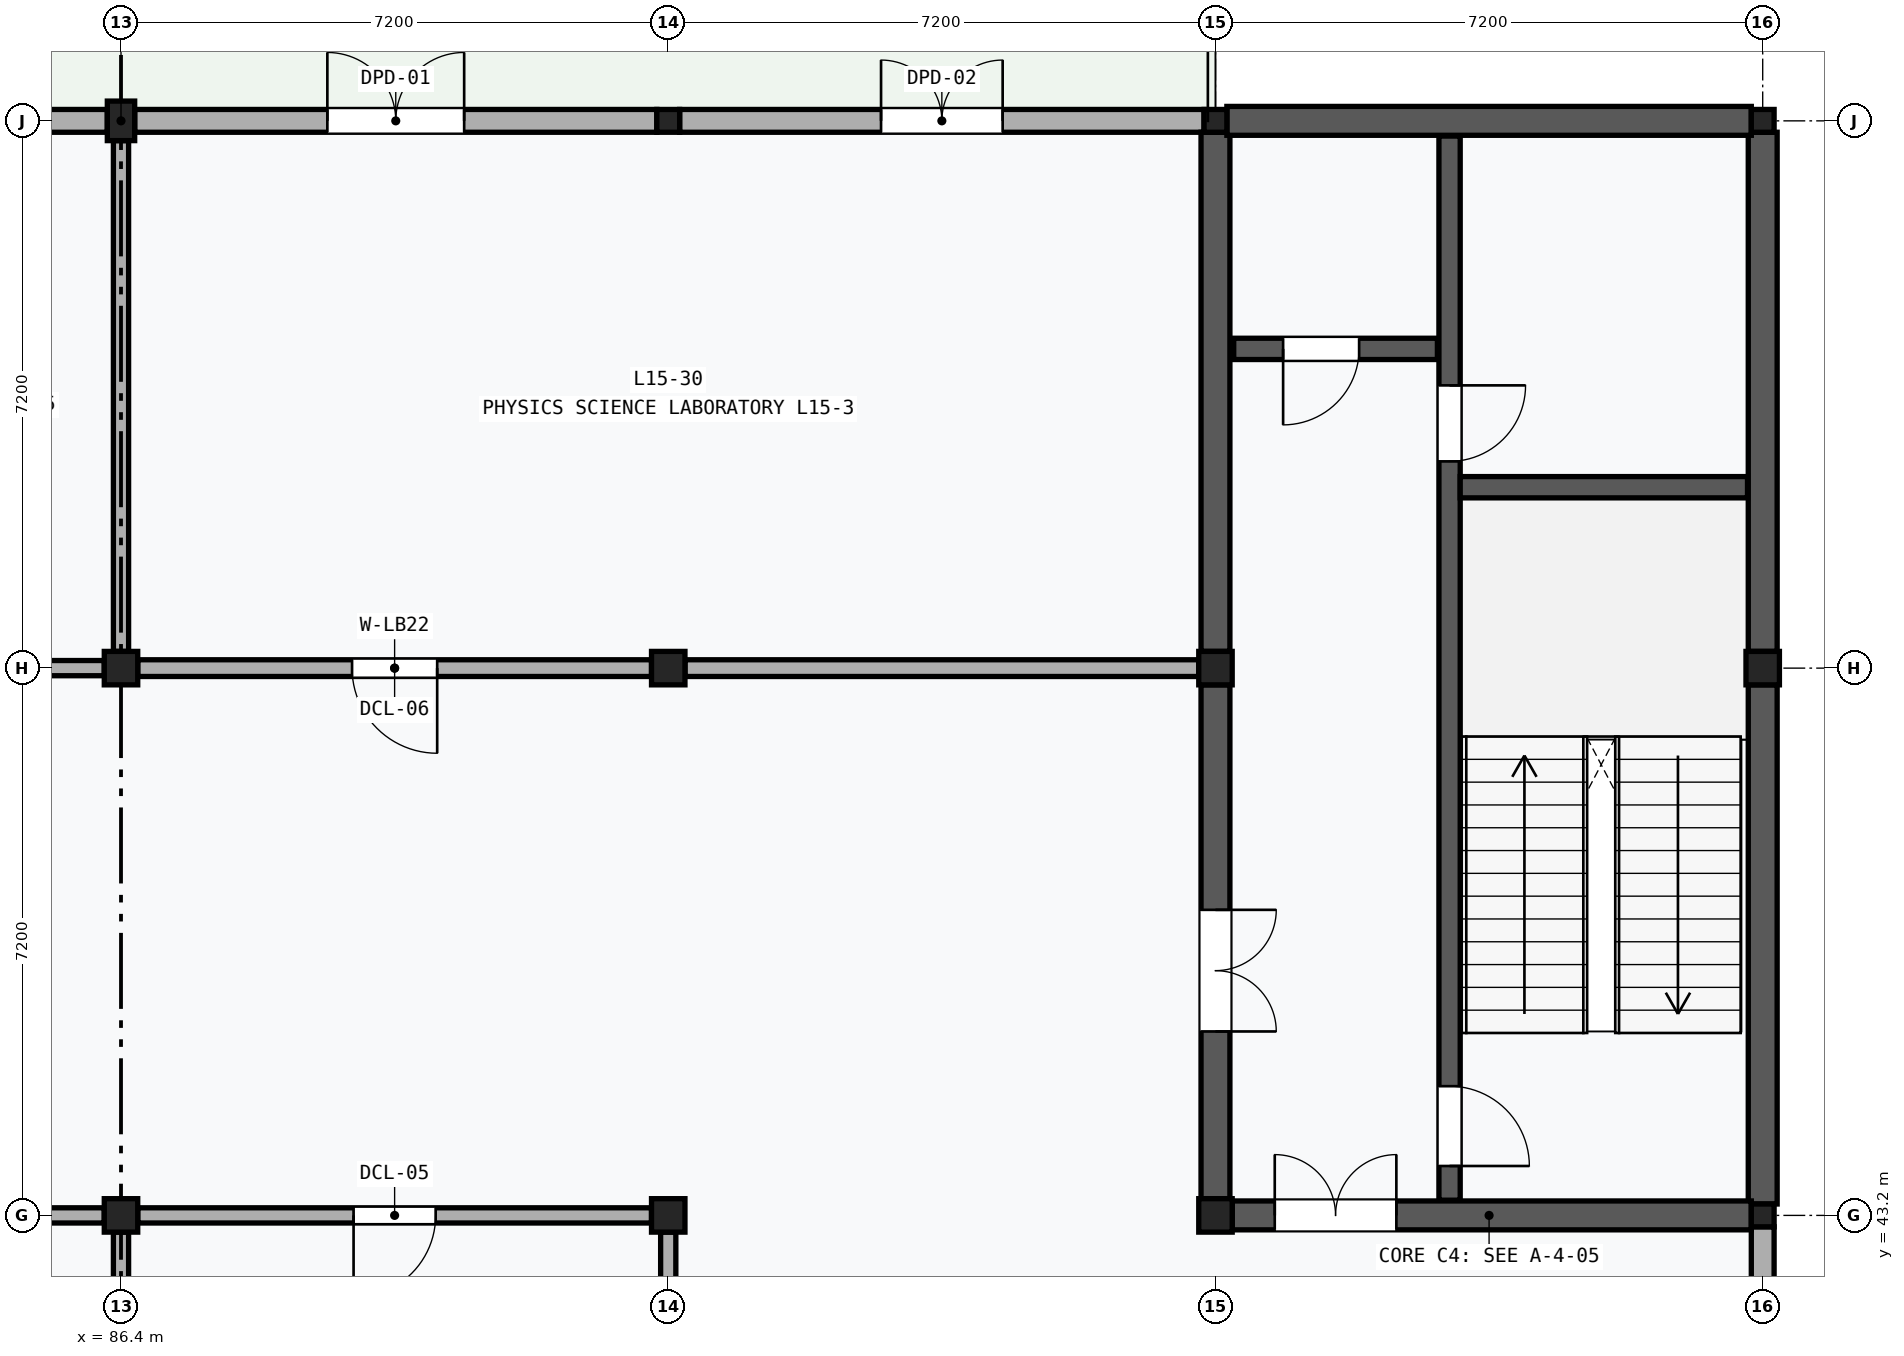
"""IFC4 building model, lengths in metres.
Left out: names, types, materials, properties, quantities, classifications, styles, units other than length and angle.
Written with IfcOpenShell. Run it as: python <this file> out.ifc"""

import sys

from ifc_helpers import new_model, si_unit, direction, frame, frame_2d, origin, origin_2d, place, context, subcontext, project, spatial, rectangle, extrude, element, fill, save


model = new_model("IFC4")
c1 = context("Model", 3, precision=1e-05, world=origin(), true_north=direction((0.0, 1.0)))
c2 = subcontext(c1, "Body", "Model", "MODEL_VIEW")
j1 = project(units=[si_unit("LENGTHUNIT", "METRE"), si_unit("PLANEANGLEUNIT", "RADIAN")], contexts=[c1])
p1 = place(None, origin())
s1 = spatial("IfcSite", under=j1, at=p1, CompositionType="ELEMENT")
p2 = place(p1, origin())
s2 = spatial("IfcBuilding", under=s1, at=p2, CompositionType="ELEMENT")
p3 = place(p2, frame((0.0, 0.0, 63.0)))
s3 = spatial("IfcBuildingStorey", under=s2, at=p3, CompositionType="ELEMENT", Elevation=63.0)
for number, where, z_axis, x_axis in (
    (1, (86.4, 43.2, 0.0), (0.0, 0.0, 1.0), (1.0, 0.0, 0.0)),
    (2, (86.4, 50.4, 0.0), (0.0, 0.0, 1.0), (1.0, 0.0, 0.0)),
):
    element("IfcColumn", number, at=place(p3, frame(where, z_axis=z_axis, x_axis=x_axis)), inside=s3, PredefinedType="COLUMN", context=c2, shape_type="SweptSolid", body=[
        extrude(rectangle(XDim=0.44, YDim=0.44, at=origin_2d()), origin(), (0.0, 0.0, 1.0), 4.2),
    ])
p4 = place(p3, frame((86.4, 57.6, 0.0), z_axis=(0.0, 0.0, 1.0), x_axis=(1.0, 0.0, 0.0)))
e3 = element("IfcColumn", 3, at=p4, inside=s3, PredefinedType="PILASTER", context=c2, shape_type="SweptSolid", body=[
    extrude(rectangle(XDim=0.36, YDim=0.52, at=origin_2d()), origin(), (0.0, 0.0, 1.0), 4.2),
])
for number, where, z_axis, x_axis in (
    (4, (93.6, 43.2, 0.0), (0.0, 0.0, 1.0), (1.0, 0.0, 0.0)),
    (5, (93.6, 50.4, 0.0), (0.0, 0.0, 1.0), (1.0, 0.0, 0.0)),
):
    element("IfcColumn", number, at=place(p3, frame(where, z_axis=z_axis, x_axis=x_axis)), inside=s3, PredefinedType="COLUMN", context=c2, shape_type="SweptSolid", body=[
        extrude(rectangle(XDim=0.44, YDim=0.44, at=origin_2d()), origin(), (0.0, 0.0, 1.0), 4.2),
    ])
p5 = place(p3, frame((93.6, 57.6, 0.0), z_axis=(0.0, 0.0, 1.0), x_axis=(1.0, 0.0, 0.0)))
e6 = element("IfcColumn", 6, at=p5, inside=s3, PredefinedType="COLUMN", context=c2, shape_type="SweptSolid", body=[
    extrude(rectangle(XDim=0.3, YDim=0.3, at=origin_2d()), origin(), (0.0, 0.0, 1.0), 4.2),
])
for number, where, z_axis, x_axis in (
    (7, (100.8, 43.2, 0.0), (0.0, 0.0, 1.0), (1.0, 0.0, 0.0)),
    (8, (100.8, 50.4, 0.0), (0.0, 0.0, 1.0), (1.0, 0.0, 0.0)),
):
    element("IfcColumn", number, at=place(p3, frame(where, z_axis=z_axis, x_axis=x_axis)), inside=s3, PredefinedType="COLUMN", context=c2, shape_type="SweptSolid", body=[
        extrude(rectangle(XDim=0.44, YDim=0.44, at=origin_2d()), origin(), (0.0, 0.0, 1.0), 4.2),
    ])
for number, where, z_axis, x_axis in (
    (9, (100.8, 57.6, 0.0), (0.0, 0.0, 1.0), (1.0, 0.0, 0.0)),
    (10, (108.0, 43.2, 0.0), (0.0, 0.0, 1.0), (1.0, 0.0, 0.0)),
):
    element("IfcColumn", number, at=place(p3, frame(where, z_axis=z_axis, x_axis=x_axis)), inside=s3, PredefinedType="COLUMN", context=c2, shape_type="SweptSolid", body=[
        extrude(rectangle(XDim=0.3, YDim=0.3, at=origin_2d()), origin(), (0.0, 0.0, 1.0), 4.2),
    ])
p6 = place(p3, frame((108.0, 50.4, 0.0), z_axis=(0.0, 0.0, 1.0), x_axis=(1.0, 0.0, 0.0)))
e11 = element("IfcColumn", 11, at=p6, inside=s3, PredefinedType="COLUMN", context=c2, shape_type="SweptSolid", body=[
    extrude(rectangle(XDim=0.44, YDim=0.44, at=origin_2d()), origin(), (0.0, 0.0, 1.0), 4.2),
])
p7 = place(p3, frame((108.0, 57.6, 0.0), z_axis=(0.0, 0.0, 1.0), x_axis=(1.0, 0.0, 0.0)))
e12 = element("IfcColumn", 12, at=p7, inside=s3, PredefinedType="COLUMN", context=c2, shape_type="SweptSolid", body=[
    extrude(rectangle(XDim=0.3, YDim=0.3, at=origin_2d()), origin(), (0.0, 0.0, 1.0), 4.2),
])
p8 = place(p3, frame((79.35, 57.6, 0.0), z_axis=(0.0, 0.0, 1.0), x_axis=(1.0, 0.0, 0.0)))
e13 = element("IfcWall", 13, at=p8, inside=s3, PredefinedType="SOLIDWALL", context=c2, shape_type="SweptSolid", body=[
    extrude(rectangle(XDim=6.87, YDim=0.3, at=frame_2d((3.435, 0.0))), origin(), (0.0, 0.0, 1.0), 3.39),
])
p9 = place(p8, frame((2.585, 0.0, 0.0)))
e14 = element("IfcOpeningElement", 14, at=p9, cuts=e13, PredefinedType="OPENING", context=c2, shape_type="SweptSolid", body=[
    extrude(rectangle(XDim=1.7, YDim=2.2, at=frame_2d((0.85, 1.1))), frame((0.0, 0.162, 0.0), z_axis=(0.0, -1.0, 0.0), x_axis=(1.0, 0.0, 0.0)), (0.0, 0.0, 1.0), 0.324),
])
p10 = place(p3, frame((86.58, 57.6, 0.0), z_axis=(0.0, 0.0, 1.0), x_axis=(1.0, 0.0, 0.0)))
e15 = element("IfcWall", 15, at=p10, inside=s3, PredefinedType="SOLIDWALL", context=c2, shape_type="SweptSolid", body=[
    extrude(rectangle(XDim=6.87, YDim=0.3, at=frame_2d((3.435, 0.0))), origin(), (0.0, 0.0, 1.0), 3.39),
])
p11 = place(p10, frame((2.535, 0.0, 0.0)))
e16 = element("IfcOpeningElement", 16, at=p11, cuts=e15, PredefinedType="OPENING", context=c2, shape_type="SweptSolid", body=[
    extrude(rectangle(XDim=1.8, YDim=2.2, at=frame_2d((0.9, 1.1))), frame((0.0, 0.162, 0.0), z_axis=(0.0, -1.0, 0.0), x_axis=(1.0, 0.0, 0.0)), (0.0, 0.0, 1.0), 0.324),
])
p12 = place(p3, frame((93.75, 57.6, 0.0), z_axis=(0.0, 0.0, 1.0), x_axis=(1.0, 0.0, 0.0)))
e17 = element("IfcWall", 17, at=p12, inside=s3, PredefinedType="SOLIDWALL", context=c2, shape_type="SweptSolid", body=[
    extrude(rectangle(XDim=6.9, YDim=0.3, at=frame_2d((3.45, 0.0))), origin(), (0.0, 0.0, 1.0), 3.39),
])
p13 = place(p12, frame((2.65, 0.0, 0.0)))
e18 = element("IfcOpeningElement", 18, at=p13, cuts=e17, PredefinedType="OPENING", context=c2, shape_type="SweptSolid", body=[
    extrude(rectangle(XDim=1.6, YDim=2.2, at=frame_2d((0.8, 1.1))), frame((0.0, 0.162, 0.0), z_axis=(0.0, -1.0, 0.0), x_axis=(1.0, 0.0, 0.0)), (0.0, 0.0, 1.0), 0.324),
])
p14 = place(p3, frame((108.0, 36.26, 0.0), z_axis=(0.0, 0.0, 1.0), x_axis=(0.0, 1.0, 0.0)))
e19 = element("IfcWall", 19, at=p14, inside=s3, PredefinedType="SOLIDWALL", context=c2, shape_type="SweptSolid", body=[
    extrude(rectangle(XDim=6.79, YDim=0.3, at=frame_2d((3.395, 0.0))), origin(), (0.0, 0.0, 1.0), 3.39),
])
p15 = place(p3, frame((100.8, 43.42, 0.0), z_axis=(0.0, 0.0, 1.0), x_axis=(0.0, 1.0, 0.0)))
e20 = element("IfcWall", 20, at=p15, inside=s3, PredefinedType="SHEAR", context=c2, shape_type="SweptSolid", body=[
    extrude(rectangle(XDim=6.76, YDim=0.38, at=frame_2d((3.38, 0.0))), origin(), (0.0, 0.0, 1.0), 3.31),
])
p16 = place(p15, frame((2.2, 0.0, 0.0)))
e21 = element("IfcOpeningElement", 21, at=p16, cuts=e20, PredefinedType="OPENING", context=c2, shape_type="SweptSolid", body=[
    extrude(rectangle(XDim=1.6, YDim=2.2, at=frame_2d((0.8, 1.1))), frame((0.0, 0.202, 0.0), z_axis=(0.0, -1.0, 0.0), x_axis=(1.0, 0.0, 0.0)), (0.0, 0.0, 1.0), 0.404),
])
p17 = place(p3, frame((100.8, 50.62, 0.0), z_axis=(0.0, 0.0, 1.0), x_axis=(0.0, 1.0, 0.0)))
e22 = element("IfcWall", 22, at=p17, inside=s3, PredefinedType="SHEAR", context=c2, shape_type="SweptSolid", body=[
    extrude(rectangle(XDim=6.83, YDim=0.38, at=frame_2d((3.415, 0.0))), origin(), (0.0, 0.0, 1.0), 3.31),
])
for number, where, z_axis, x_axis in (
    (23, (108.0, 43.35, 0.0), (0.0, 0.0, 1.0), (0.0, 1.0, 0.0)),
    (24, (108.0, 50.62, 0.0), (0.0, 0.0, 1.0), (0.0, 1.0, 0.0)),
):
    element("IfcWall", number, at=place(p3, frame(where, z_axis=z_axis, x_axis=x_axis)), inside=s3, PredefinedType="SHEAR", context=c2, shape_type="SweptSolid", body=[
        extrude(rectangle(XDim=6.83, YDim=0.38, at=frame_2d((3.415, 0.0))), origin(), (0.0, 0.0, 1.0), 3.39),
    ])
p18 = place(p3, frame((101.02, 43.2, 0.0), z_axis=(0.0, 0.0, 1.0), x_axis=(1.0, 0.0, 0.0)))
e25 = element("IfcWall", 25, at=p18, inside=s3, PredefinedType="SHEAR", context=c2, shape_type="SweptSolid", body=[
    extrude(rectangle(XDim=6.83, YDim=0.38, at=frame_2d((3.415, 0.0))), origin(), (0.0, 0.0, 1.0), 3.31),
])
p19 = place(p18, frame((0.56, 0.0, 0.0)))
e26 = element("IfcOpeningElement", 26, at=p19, cuts=e25, PredefinedType="OPENING", context=c2, shape_type="SweptSolid", body=[
    extrude(rectangle(XDim=1.6, YDim=2.2, at=frame_2d((0.8, 1.1))), frame((0.0, 0.202, 0.0), z_axis=(0.0, -1.0, 0.0), x_axis=(1.0, 0.0, 0.0)), (0.0, 0.0, 1.0), 0.404),
])
p20 = place(p3, frame((100.95, 57.6, 0.0), z_axis=(0.0, 0.0, 1.0), x_axis=(1.0, 0.0, 0.0)))
e27 = element("IfcWall", 27, at=p20, inside=s3, PredefinedType="SHEAR", context=c2, shape_type="SweptSolid", body=[
    extrude(rectangle(XDim=6.9, YDim=0.38, at=frame_2d((3.45, 0.0))), origin(), (0.0, 0.0, 1.0), 3.39),
])
p21 = place(p3, frame((103.88, 43.4, 0.0), z_axis=(0.0, 0.0, 1.0), x_axis=(0.0, 1.0, 0.0)))
e28 = element("IfcWall", 28, at=p21, inside=s3, PredefinedType="SHEAR", context=c2, shape_type="SweptSolid", body=[
    extrude(rectangle(XDim=14.0, YDim=0.28, at=frame_2d((7.0, 0.0))), origin(), (0.0, 0.0, 1.0), 3.96),
])
p22 = place(p21, frame((0.45, 0.0, 0.0)))
e29 = element("IfcOpeningElement", 29, at=p22, cuts=e28, PredefinedType="OPENING", context=c2, shape_type="SweptSolid", body=[
    extrude(rectangle(XDim=1.05, YDim=2.15, at=frame_2d((0.525, 1.075))), frame((0.0, 0.152, 0.0), z_axis=(0.0, -1.0, 0.0), x_axis=(1.0, 0.0, 0.0)), (0.0, 0.0, 1.0), 0.304),
])
p23 = place(p21, frame((9.72, 0.0, 0.0)))
e30 = element("IfcOpeningElement", 30, at=p23, cuts=e28, PredefinedType="OPENING", context=c2, shape_type="SweptSolid", body=[
    extrude(rectangle(XDim=1.0, YDim=2.15, at=frame_2d((0.5, 1.075))), frame((0.0, 0.152, 0.0), z_axis=(0.0, -1.0, 0.0), x_axis=(1.0, 0.0, 0.0)), (0.0, 0.0, 1.0), 0.304),
])
p24 = place(p3, frame((104.02, 52.78, 0.0), z_axis=(0.0, 0.0, 1.0), x_axis=(1.0, 0.0, 0.0)))
e31 = element("IfcWall", 31, at=p24, inside=s3, PredefinedType="SHEAR", context=c2, shape_type="SweptSolid", body=[
    extrude(rectangle(XDim=3.78, YDim=0.28, at=frame_2d((1.89, 0.0))), origin(), (0.0, 0.0, 1.0), 3.96),
])
p25 = place(p3, frame((101.04, 54.6, 0.0), z_axis=(0.0, 0.0, 1.0), x_axis=(1.0, 0.0, 0.0)))
e32 = element("IfcWall", 32, at=p25, inside=s3, PredefinedType="SHEAR", context=c2, shape_type="SweptSolid", body=[
    extrude(rectangle(XDim=2.68, YDim=0.28, at=frame_2d((1.34, 0.0))), origin(), (0.0, 0.0, 1.0), 3.96),
])
p26 = place(p25, frame((0.65, 0.0, 0.0)))
e33 = element("IfcOpeningElement", 33, at=p26, cuts=e32, PredefinedType="OPENING", context=c2, shape_type="SweptSolid", body=[
    extrude(rectangle(XDim=1.0, YDim=2.15, at=frame_2d((0.5, 1.075))), frame((0.0, 0.152, 0.0), z_axis=(0.0, -1.0, 0.0), x_axis=(1.0, 0.0, 0.0)), (0.0, 0.0, 1.0), 0.304),
])
p27 = place(p3, frame((79.42, 43.2, 0.0), z_axis=(0.0, 0.0, 1.0), x_axis=(1.0, 0.0, 0.0)))
e34 = element("IfcWall", 34, at=p27, inside=s3, PredefinedType="PARTITIONING", context=c2, shape_type="SweptSolid", body=[
    extrude(rectangle(XDim=6.76, YDim=0.2, at=frame_2d((3.38, 0.0))), origin(), (0.0, 0.0, 1.0), 3.31),
])
p28 = place(p27, frame((2.87, 0.0, 0.0)))
e35 = element("IfcOpeningElement", 35, at=p28, cuts=e34, PredefinedType="OPENING", context=c2, shape_type="SweptSolid", body=[
    extrude(rectangle(XDim=1.02, YDim=2.12, at=frame_2d((0.51, 1.06))), frame((0.0, 0.112, 0.0), z_axis=(0.0, -1.0, 0.0), x_axis=(1.0, 0.0, 0.0)), (0.0, 0.0, 1.0), 0.224),
])
p29 = place(p3, frame((86.4, 36.22, 0.0), z_axis=(0.0, 0.0, 1.0), x_axis=(0.0, 1.0, 0.0)))
e36 = element("IfcWall", 36, at=p29, inside=s3, PredefinedType="PARTITIONING", context=c2, shape_type="SweptSolid", body=[
    extrude(rectangle(XDim=6.76, YDim=0.2, at=frame_2d((3.38, 0.0))), origin(), (0.0, 0.0, 1.0), 3.31),
])
p30 = place(p3, frame((79.42, 50.4, 0.0), z_axis=(0.0, 0.0, 1.0), x_axis=(1.0, 0.0, 0.0)))
e37 = element("IfcWall", 37, at=p30, inside=s3, PredefinedType="PARTITIONING", context=c2, shape_type="SweptSolid", body=[
    extrude(rectangle(XDim=6.76, YDim=0.2, at=frame_2d((3.38, 0.0))), origin(), (0.0, 0.0, 1.0), 3.31),
])
p31 = place(p30, frame((2.86, 0.0, 0.0)))
e38 = element("IfcOpeningElement", 38, at=p31, cuts=e37, PredefinedType="OPENING", context=c2, shape_type="SweptSolid", body=[
    extrude(rectangle(XDim=1.04, YDim=2.14, at=frame_2d((0.52, 1.07))), frame((0.0, 0.112, 0.0), z_axis=(0.0, -1.0, 0.0), x_axis=(1.0, 0.0, 0.0)), (0.0, 0.0, 1.0), 0.224),
])
p32 = place(p3, frame((86.4, 50.62, 0.0), z_axis=(0.0, 0.0, 1.0), x_axis=(0.0, 1.0, 0.0)))
e39 = element("IfcWall", 39, at=p32, inside=s3, PredefinedType="PARTITIONING", context=c2, shape_type="SweptSolid", body=[
    extrude(rectangle(XDim=6.72, YDim=0.2, at=frame_2d((3.36, 0.0))), origin(), (0.0, 0.0, 1.0), 3.31),
])
p33 = place(p3, frame((86.62, 43.2, 0.0), z_axis=(0.0, 0.0, 1.0), x_axis=(1.0, 0.0, 0.0)))
e40 = element("IfcWall", 40, at=p33, inside=s3, PredefinedType="PARTITIONING", context=c2, shape_type="SweptSolid", body=[
    extrude(rectangle(XDim=6.76, YDim=0.2, at=frame_2d((3.38, 0.0))), origin(), (0.0, 0.0, 1.0), 3.31),
])
p34 = place(p33, frame((2.84, 0.0, 0.0)))
e41 = element("IfcOpeningElement", 41, at=p34, cuts=e40, PredefinedType="OPENING", context=c2, shape_type="SweptSolid", body=[
    extrude(rectangle(XDim=1.08, YDim=2.18, at=frame_2d((0.54, 1.09))), frame((0.0, 0.112, 0.0), z_axis=(0.0, -1.0, 0.0), x_axis=(1.0, 0.0, 0.0)), (0.0, 0.0, 1.0), 0.224),
])
p35 = place(p3, frame((93.6, 36.22, 0.0), z_axis=(0.0, 0.0, 1.0), x_axis=(0.0, 1.0, 0.0)))
e42 = element("IfcWall", 42, at=p35, inside=s3, PredefinedType="PARTITIONING", context=c2, shape_type="SweptSolid", body=[
    extrude(rectangle(XDim=6.76, YDim=0.2, at=frame_2d((3.38, 0.0))), origin(), (0.0, 0.0, 1.0), 3.31),
])
p36 = place(p3, frame((86.62, 50.4, 0.0), z_axis=(0.0, 0.0, 1.0), x_axis=(1.0, 0.0, 0.0)))
e43 = element("IfcWall", 43, at=p36, inside=s3, PredefinedType="PARTITIONING", context=c2, shape_type="SweptSolid", body=[
    extrude(rectangle(XDim=6.76, YDim=0.22, at=frame_2d((3.38, 0.0))), origin(), (0.0, 0.0, 1.0), 3.31),
])
p37 = place(p36, frame((2.82, 0.0, 0.0)))
e44 = element("IfcOpeningElement", 44, at=p37, cuts=e43, PredefinedType="OPENING", context=c2, shape_type="SweptSolid", body=[
    extrude(rectangle(XDim=1.12, YDim=2.2, at=frame_2d((0.56, 1.1))), frame((0.0, 0.122, 0.0), z_axis=(0.0, -1.0, 0.0), x_axis=(1.0, 0.0, 0.0)), (0.0, 0.0, 1.0), 0.244),
])
p38 = place(p3, frame((93.82, 50.4, 0.0), z_axis=(0.0, 0.0, 1.0), x_axis=(1.0, 0.0, 0.0)))
e45 = element("IfcWall", 45, at=p38, inside=s3, PredefinedType="PARTITIONING", context=c2, shape_type="SweptSolid", body=[
    extrude(rectangle(XDim=6.76, YDim=0.22, at=frame_2d((3.38, 0.0))), origin(), (0.0, 0.0, 1.0), 3.31),
])
p39 = place(p11, origin())
e46 = element("IfcDoor", 46, at=p39, inside=s3, OperationType="DOUBLE_DOOR_SINGLE_SWING", PredefinedType="DOOR", context=c2, shape_type="SweptSolid", body=[
    extrude(rectangle(XDim=1.8, YDim=2.2, at=frame_2d((0.9, 1.1))), frame((0.0, 0.025, 0.0), z_axis=(0.0, -1.0, 0.0), x_axis=(1.0, 0.0, 0.0)), (0.0, 0.0, 1.0), 0.05),
])
fill(e16, e46)
p40 = place(p13, origin())
e47 = element("IfcDoor", 47, at=p40, inside=s3, OperationType="DOUBLE_DOOR_SINGLE_SWING", PredefinedType="DOOR", context=c2, shape_type="SweptSolid", body=[
    extrude(rectangle(XDim=1.6, YDim=2.2, at=frame_2d((0.8, 1.1))), frame((0.0, 0.025, 0.0), z_axis=(0.0, -1.0, 0.0), x_axis=(1.0, 0.0, 0.0)), (0.0, 0.0, 1.0), 0.05),
])
fill(e18, e47)
p41 = place(p16, frame((1.6, 0.0, 0.0), z_axis=(0.0, 0.0, 1.0), x_axis=(-1.0, 0.0, 0.0)))
e48 = element("IfcDoor", 48, at=p41, inside=s3, OperationType="DOUBLE_DOOR_SINGLE_SWING", PredefinedType="DOOR", context=c2, shape_type="SweptSolid", body=[
    extrude(rectangle(XDim=1.6, YDim=2.2, at=frame_2d((0.8, 1.1))), frame((0.0, 0.025, 0.0), z_axis=(0.0, -1.0, 0.0), x_axis=(1.0, 0.0, 0.0)), (0.0, 0.0, 1.0), 0.05),
])
fill(e21, e48)
p42 = place(p19, origin())
e49 = element("IfcDoor", 49, at=p42, inside=s3, OperationType="DOUBLE_DOOR_SINGLE_SWING", PredefinedType="DOOR", context=c2, shape_type="SweptSolid", body=[
    extrude(rectangle(XDim=1.6, YDim=2.2, at=frame_2d((0.8, 1.1))), frame((0.0, 0.025, 0.0), z_axis=(0.0, -1.0, 0.0), x_axis=(1.0, 0.0, 0.0)), (0.0, 0.0, 1.0), 0.05),
])
fill(e26, e49)
p43 = place(p22, frame((1.05, 0.0, 0.0), z_axis=(0.0, 0.0, 1.0), x_axis=(-1.0, 0.0, 0.0)))
e50 = element("IfcDoor", 50, at=p43, inside=s3, OperationType="SINGLE_SWING_RIGHT", PredefinedType="DOOR", context=c2, shape_type="SweptSolid", body=[
    extrude(rectangle(XDim=1.05, YDim=2.15, at=frame_2d((0.525, 1.075))), frame((0.0, 0.025, 0.0), z_axis=(0.0, -1.0, 0.0), x_axis=(1.0, 0.0, 0.0)), (0.0, 0.0, 1.0), 0.05),
])
fill(e29, e50)
p44 = place(p23, frame((1.0, 0.0, 0.0), z_axis=(0.0, 0.0, 1.0), x_axis=(-1.0, 0.0, 0.0)))
e51 = element("IfcDoor", 51, at=p44, inside=s3, OperationType="SINGLE_SWING_LEFT", PredefinedType="DOOR", context=c2, shape_type="SweptSolid", body=[
    extrude(rectangle(XDim=1.0, YDim=2.15, at=frame_2d((0.5, 1.075))), frame((0.0, 0.025, 0.0), z_axis=(0.0, -1.0, 0.0), x_axis=(1.0, 0.0, 0.0)), (0.0, 0.0, 1.0), 0.05),
])
fill(e30, e51)
p45 = place(p26, frame((1.0, 0.0, 0.0), z_axis=(0.0, 0.0, 1.0), x_axis=(-1.0, 0.0, 0.0)))
e52 = element("IfcDoor", 52, at=p45, inside=s3, OperationType="SINGLE_SWING_RIGHT", PredefinedType="DOOR", context=c2, shape_type="SweptSolid", body=[
    extrude(rectangle(XDim=1.0, YDim=2.15, at=frame_2d((0.5, 1.075))), frame((0.0, 0.025, 0.0), z_axis=(0.0, -1.0, 0.0), x_axis=(1.0, 0.0, 0.0)), (0.0, 0.0, 1.0), 0.05),
])
fill(e33, e52)
p46 = place(p34, frame((1.08, 0.0, 0.0), z_axis=(0.0, 0.0, 1.0), x_axis=(-1.0, 0.0, 0.0)))
e53 = element("IfcDoor", 53, at=p46, inside=s3, OperationType="SINGLE_SWING_RIGHT", PredefinedType="DOOR", context=c2, shape_type="SweptSolid", body=[
    extrude(rectangle(XDim=1.08, YDim=2.18, at=frame_2d((0.54, 1.09))), frame((0.0, 0.025, 0.0), z_axis=(0.0, -1.0, 0.0), x_axis=(1.0, 0.0, 0.0)), (0.0, 0.0, 1.0), 0.05),
])
fill(e41, e53)
p47 = place(p37, frame((1.12, 0.0, 0.0), z_axis=(0.0, 0.0, 1.0), x_axis=(-1.0, 0.0, 0.0)))
e54 = element("IfcDoor", 54, at=p47, inside=s3, OperationType="SINGLE_SWING_LEFT", PredefinedType="DOOR", context=c2, shape_type="SweptSolid", body=[
    extrude(rectangle(XDim=1.12, YDim=2.2, at=frame_2d((0.56, 1.1))), frame((0.0, 0.025, 0.0), z_axis=(0.0, -1.0, 0.0), x_axis=(1.0, 0.0, 0.0)), (0.0, 0.0, 1.0), 0.05),
])
fill(e44, e54)
save(model, sys.argv[1])
